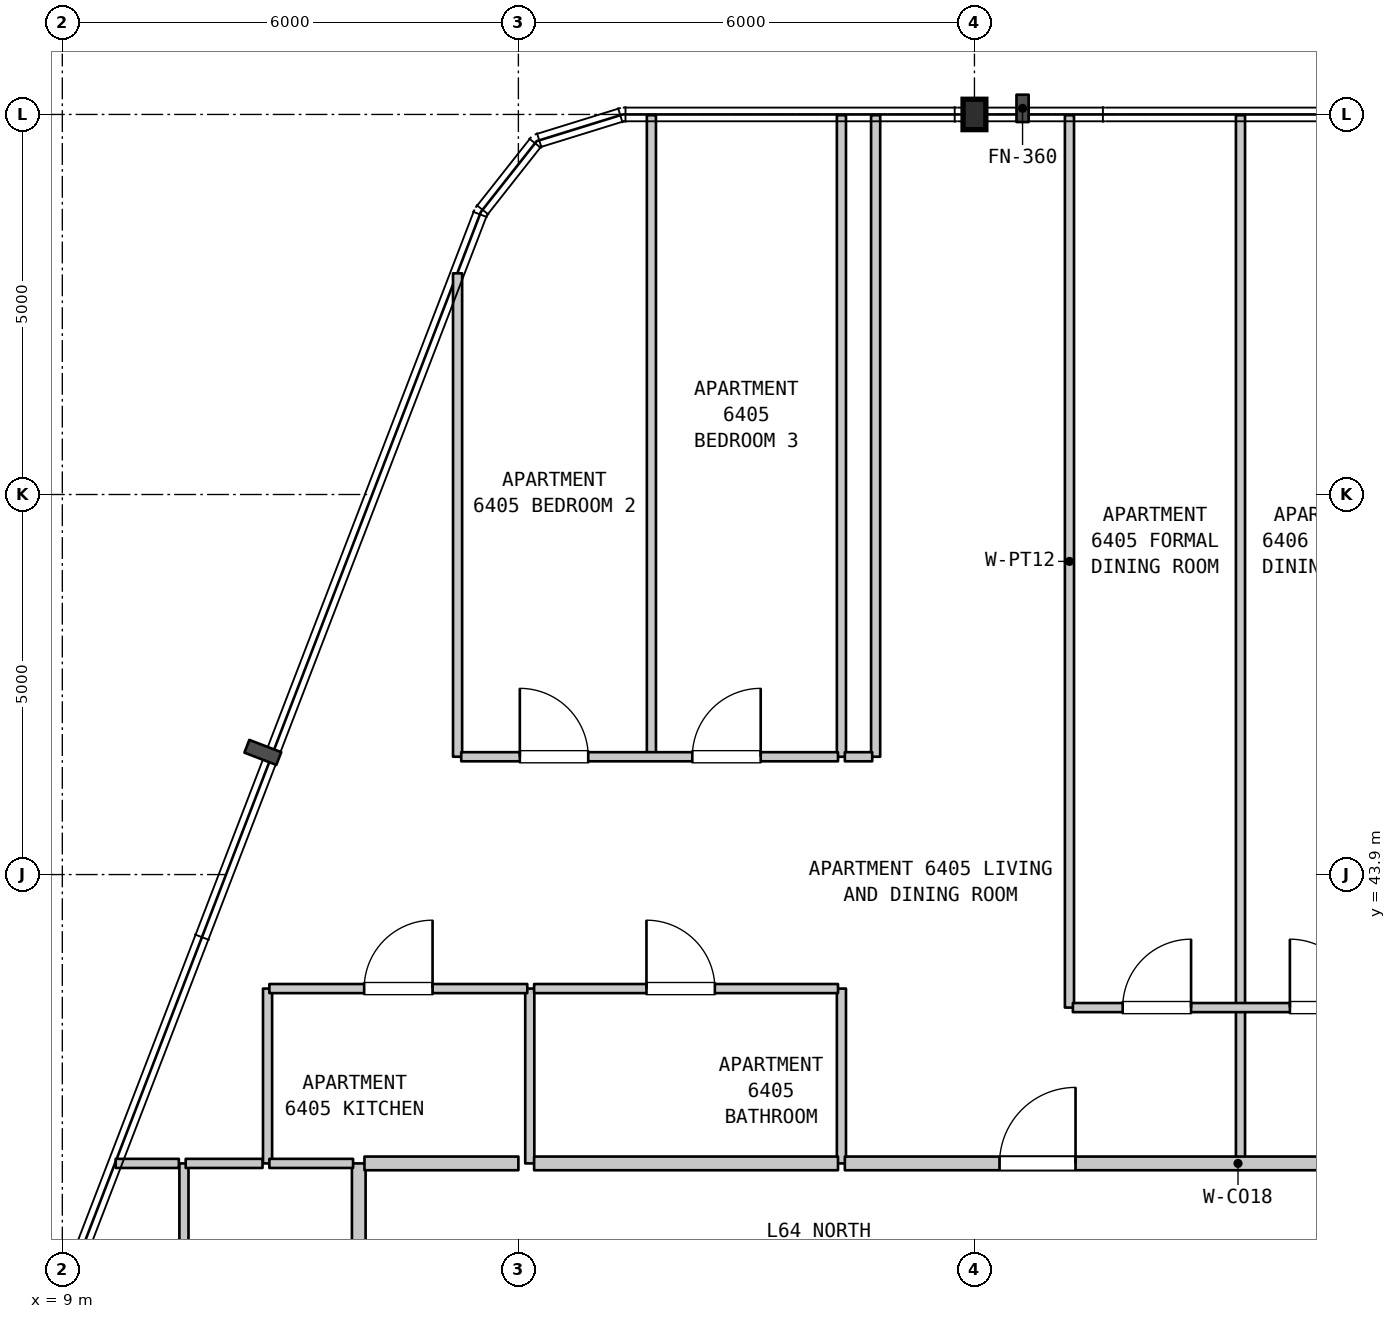
"""IFC4 building model, lengths in metres.
Left out: names, types, materials, properties, quantities, classifications, styles, units other than length and angle.
Written with IfcOpenShell. Run it as: python <this file> out.ifc"""

import sys

from ifc_helpers import new_model, si_unit, direction, frame, frame_2d, origin, origin_2d, place, context, subcontext, project, spatial, rectangle, i_section, extrude, element, fill, save


model = new_model("IFC4")
c1 = context("Model", 3, precision=1e-05, world=origin(), true_north=direction((0.0, 1.0)))
c2 = subcontext(c1, "Body", "Model", "MODEL_VIEW")
j1 = project(units=[si_unit("LENGTHUNIT", "METRE"), si_unit("PLANEANGLEUNIT", "RADIAN")], contexts=[c1])
p1 = place(None, origin())
s1 = spatial("IfcSite", under=j1, at=p1, CompositionType="ELEMENT")
p2 = place(p1, origin())
s2 = spatial("IfcBuilding", under=s1, at=p2, CompositionType="ELEMENT")
p3 = place(p2, frame((0.0, 0.0, 258.4)))
s3 = spatial("IfcBuildingStorey", under=s2, at=p3, CompositionType="ELEMENT", Elevation=258.4)
p4 = place(p3, frame((21.0, 53.9, 0.0), z_axis=(0.0, 0.0, 1.0), x_axis=(1.0, 0.0, 0.0)))
e1 = element("IfcColumn", 1, at=p4, inside=s3, PredefinedType="COLUMN", context=c2, shape_type="SweptSolid", body=[
    extrude(i_section(OverallWidth=0.3, OverallDepth=0.4, WebThickness=0.013, FlangeThickness=0.024, FilletRadius=0.027, at=origin_2d()), origin(), (0.0, 0.0, 1.0), 3.7),
])
p5 = place(p3, frame((10.6, 31.5, 0.0), z_axis=(0.0, 0.0, 1.0), x_axis=(0.0, 1.0, 0.0)))
e2 = element("IfcWall", 2, at=p5, inside=s3, PredefinedType="PARTITIONING", context=c2, shape_type="SweptSolid", body=[
    extrude(rectangle(XDim=8.6, YDim=0.12, at=frame_2d((4.3, 0.0))), origin(), (0.0, 0.0, 1.0), 3.39),
])
p6 = place(p3, frame((11.7, 40.1, 0.0), z_axis=(0.0, 0.0, 1.0), x_axis=(0.0, 1.0, 0.0)))
e3 = element("IfcWall", 3, at=p6, inside=s3, PredefinedType="PARTITIONING", context=c2, shape_type="SweptSolid", body=[
    extrude(rectangle(XDim=2.3, YDim=0.12, at=frame_2d((1.15, 0.0))), origin(), (0.0, 0.0, 1.0), 3.39),
])
p7 = place(p3, frame((12.9, 31.5, 0.0), z_axis=(0.0, 0.0, 1.0), x_axis=(0.0, 1.0, 0.0)))
e4 = element("IfcWall", 4, at=p7, inside=s3, PredefinedType="STANDARD", context=c2, shape_type="SweptSolid", body=[
    extrude(rectangle(XDim=8.6, YDim=0.18, at=frame_2d((4.3, 0.0))), origin(), (0.0, 0.0, 1.0), 3.39),
])
p8 = place(p3, frame((14.2, 45.45, 0.0), z_axis=(0.0, 0.0, 1.0), x_axis=(0.0, 1.0, 0.0)))
e5 = element("IfcWall", 5, at=p8, inside=s3, PredefinedType="PARTITIONING", context=c2, shape_type="SweptSolid", body=[
    extrude(rectangle(XDim=6.36, YDim=0.12, at=frame_2d((3.18, 0.0))), origin(), (0.0, 0.0, 1.0), 3.39),
])
p9 = place(p3, frame((15.15, 40.1, 0.0), z_axis=(0.0, 0.0, 1.0), x_axis=(0.0, 1.0, 0.0)))
e6 = element("IfcWall", 6, at=p9, inside=s3, PredefinedType="PARTITIONING", context=c2, shape_type="SweptSolid", body=[
    extrude(rectangle(XDim=2.3, YDim=0.12, at=frame_2d((1.15, 0.0))), origin(), (0.0, 0.0, 1.0), 3.39),
])
p10 = place(p3, frame((16.75, 45.45, 0.0), z_axis=(0.0, 0.0, 1.0), x_axis=(0.0, 1.0, 0.0)))
e7 = element("IfcWall", 7, at=p10, inside=s3, PredefinedType="PARTITIONING", context=c2, shape_type="SweptSolid", body=[
    extrude(rectangle(XDim=8.44, YDim=0.12, at=frame_2d((4.22, 0.0))), origin(), (0.0, 0.0, 1.0), 3.39),
])
p11 = place(p3, frame((19.25, 40.1, 0.0), z_axis=(0.0, 0.0, 1.0), x_axis=(0.0, 1.0, 0.0)))
e8 = element("IfcWall", 8, at=p11, inside=s3, PredefinedType="PARTITIONING", context=c2, shape_type="SweptSolid", body=[
    extrude(rectangle(XDim=2.3, YDim=0.12, at=frame_2d((1.15, 0.0))), origin(), (0.0, 0.0, 1.0), 3.39),
])
for number, where, z_axis, x_axis in (
    (9, (19.25, 45.45, 0.0), (0.0, 0.0, 1.0), (0.0, 1.0, 0.0)),
    (10, (19.7, 45.45, 0.0), (0.0, 0.0, 1.0), (0.0, 1.0, 0.0)),
):
    element("IfcWall", number, at=place(p3, frame(where, z_axis=z_axis, x_axis=x_axis)), inside=s3, PredefinedType="PARTITIONING", context=c2, shape_type="SweptSolid", body=[
        extrude(rectangle(XDim=8.44, YDim=0.12, at=frame_2d((4.22, 0.0))), origin(), (0.0, 0.0, 1.0), 3.39),
    ])
p12 = place(p3, frame((22.25, 42.15, 0.0), z_axis=(0.0, 0.0, 1.0), x_axis=(0.0, 1.0, 0.0)))
e11 = element("IfcWall", 11, at=p12, inside=s3, PredefinedType="PARTITIONING", context=c2, shape_type="SweptSolid", body=[
    extrude(rectangle(XDim=11.74, YDim=0.12, at=frame_2d((5.87, 0.0))), origin(), (0.0, 0.0, 1.0), 3.39),
])
p13 = place(p3, frame((24.5, 40.1, 0.0), z_axis=(0.0, 0.0, 1.0), x_axis=(0.0, 1.0, 0.0)))
e12 = element("IfcWall", 12, at=p13, inside=s3, PredefinedType="PARTITIONING", context=c2, shape_type="SweptSolid", body=[
    extrude(rectangle(XDim=2.05, YDim=0.12, at=frame_2d((1.025, 0.0))), origin(), (0.0, 0.0, 1.0), 3.39),
])
p14 = place(p3, frame((24.5, 42.15, 0.0), z_axis=(0.0, 0.0, 1.0), x_axis=(0.0, 1.0, 0.0)))
e13 = element("IfcWall", 13, at=p14, inside=s3, PredefinedType="PARTITIONING", context=c2, shape_type="SweptSolid", body=[
    extrude(rectangle(XDim=11.74, YDim=0.12, at=frame_2d((5.87, 0.0))), origin(), (0.0, 0.0, 1.0), 3.39),
])
p15 = place(p3, frame((9.702, 40.1, 0.0), z_axis=(0.0, 0.0, 1.0), x_axis=(1.0, 0.0, 0.0)))
e14 = element("IfcWall", 14, at=p15, inside=s3, PredefinedType="PARTITIONING", context=c2, shape_type="SweptSolid", body=[
    extrude(rectangle(XDim=0.831, YDim=0.12, at=frame_2d((0.416, 0.0))), origin(), (0.0, 0.0, 1.0), 3.39),
])
p16 = place(p3, frame((10.623, 40.1, 0.0), z_axis=(0.0, 0.0, 1.0), x_axis=(1.0, 0.0, 0.0)))
e15 = element("IfcWall", 15, at=p16, inside=s3, PredefinedType="PARTITIONING", context=c2, shape_type="SweptSolid", body=[
    extrude(rectangle(XDim=1.011, YDim=0.12, at=frame_2d((0.505, 0.0))), origin(), (0.0, 0.0, 1.0), 3.39),
])
p17 = place(p3, frame((11.724, 40.1, 0.0), z_axis=(0.0, 0.0, 1.0), x_axis=(1.0, 0.0, 0.0)))
e16 = element("IfcWall", 16, at=p17, inside=s3, PredefinedType="PARTITIONING", context=c2, shape_type="SweptSolid", body=[
    extrude(rectangle(XDim=1.101, YDim=0.12, at=frame_2d((0.55, 0.0))), origin(), (0.0, 0.0, 1.0), 3.39),
])
p18 = place(p3, frame((12.975, 40.1, 0.0), z_axis=(0.0, 0.0, 1.0), x_axis=(1.0, 0.0, 0.0)))
e17 = element("IfcWall", 17, at=p18, inside=s3, PredefinedType="STANDARD", context=c2, shape_type="SweptSolid", body=[
    extrude(rectangle(XDim=2.025, YDim=0.18, at=frame_2d((1.012, 0.0))), origin(), (0.0, 0.0, 1.0), 3.39),
])
p19 = place(p3, frame((15.207, 40.1, 0.0), z_axis=(0.0, 0.0, 1.0), x_axis=(1.0, 0.0, 0.0)))
e18 = element("IfcWall", 18, at=p19, inside=s3, PredefinedType="STANDARD", context=c2, shape_type="SweptSolid", body=[
    extrude(rectangle(XDim=3.998, YDim=0.18, at=frame_2d((1.999, 0.0))), origin(), (0.0, 0.0, 1.0), 3.39),
])
p20 = place(p3, frame((19.295, 40.1, 0.0), z_axis=(0.0, 0.0, 1.0), x_axis=(1.0, 0.0, 0.0)))
e19 = element("IfcWall", 19, at=p20, inside=s3, PredefinedType="STANDARD", context=c2, shape_type="SweptSolid", body=[
    extrude(rectangle(XDim=10.345, YDim=0.18, at=frame_2d((5.172, 0.0))), origin(), (0.0, 0.0, 1.0), 3.39),
])
p21 = place(p20, frame((2.035, 0.0, 0.0)))
e20 = element("IfcOpeningElement", 20, at=p21, cuts=e19, PredefinedType="OPENING", context=c2, shape_type="SweptSolid", body=[
    extrude(rectangle(XDim=1.0, YDim=2.15, at=frame_2d((0.5, 1.075))), frame((0.0, 0.1, 0.0), z_axis=(0.0, -1.0, 0.0), x_axis=(1.0, 0.0, 0.0)), (0.0, 0.0, 1.0), 0.2),
])
p22 = place(p20, frame((7.235, 0.0, 0.0)))
e21 = element("IfcOpeningElement", 21, at=p22, cuts=e19, PredefinedType="OPENING", context=c2, shape_type="SweptSolid", body=[
    extrude(rectangle(XDim=1.0, YDim=2.15, at=frame_2d((0.5, 1.075))), frame((0.0, 0.1, 0.0), z_axis=(0.0, -1.0, 0.0), x_axis=(1.0, 0.0, 0.0)), (0.0, 0.0, 1.0), 0.2),
])
p23 = place(p3, frame((22.295, 42.15, 0.0), z_axis=(0.0, 0.0, 1.0), x_axis=(1.0, 0.0, 0.0)))
e22 = element("IfcWall", 22, at=p23, inside=s3, PredefinedType="PARTITIONING", context=c2, shape_type="SweptSolid", body=[
    extrude(rectangle(XDim=4.41, YDim=0.12, at=frame_2d((2.205, 0.0))), origin(), (0.0, 0.0, 1.0), 3.39),
])
p24 = place(p23, frame((0.655, 0.0, 0.0)))
e23 = element("IfcOpeningElement", 23, at=p24, cuts=e22, PredefinedType="OPENING", context=c2, shape_type="SweptSolid", body=[
    extrude(rectangle(XDim=0.9, YDim=2.15, at=frame_2d((0.45, 1.075))), frame((0.0, 0.07, 0.0), z_axis=(0.0, -1.0, 0.0), x_axis=(1.0, 0.0, 0.0)), (0.0, 0.0, 1.0), 0.14),
])
p25 = place(p23, frame((2.855, 0.0, 0.0)))
e24 = element("IfcOpeningElement", 24, at=p25, cuts=e22, PredefinedType="OPENING", context=c2, shape_type="SweptSolid", body=[
    extrude(rectangle(XDim=0.9, YDim=2.15, at=frame_2d((0.45, 1.075))), frame((0.0, 0.07, 0.0), z_axis=(0.0, -1.0, 0.0), x_axis=(1.0, 0.0, 0.0)), (0.0, 0.0, 1.0), 0.14),
])
p26 = place(p3, frame((11.724, 42.4, 0.0), z_axis=(0.0, 0.0, 1.0), x_axis=(1.0, 0.0, 0.0)))
e25 = element("IfcWall", 25, at=p26, inside=s3, PredefinedType="PARTITIONING", context=c2, shape_type="SweptSolid", body=[
    extrude(rectangle(XDim=3.393, YDim=0.12, at=frame_2d((1.696, 0.0))), origin(), (0.0, 0.0, 1.0), 3.39),
])
p27 = place(p26, frame((1.247, 0.0, 0.0)))
e26 = element("IfcOpeningElement", 26, at=p27, cuts=e25, PredefinedType="OPENING", context=c2, shape_type="SweptSolid", body=[
    extrude(rectangle(XDim=0.9, YDim=2.15, at=frame_2d((0.45, 1.075))), frame((0.0, 0.07, 0.0), z_axis=(0.0, -1.0, 0.0), x_axis=(1.0, 0.0, 0.0)), (0.0, 0.0, 1.0), 0.14),
])
p28 = place(p3, frame((15.207, 42.4, 0.0), z_axis=(0.0, 0.0, 1.0), x_axis=(1.0, 0.0, 0.0)))
e27 = element("IfcWall", 27, at=p28, inside=s3, PredefinedType="PARTITIONING", context=c2, shape_type="SweptSolid", body=[
    extrude(rectangle(XDim=3.998, YDim=0.12, at=frame_2d((1.999, 0.0))), origin(), (0.0, 0.0, 1.0), 3.39),
])
p29 = place(p28, frame((1.478, 0.0, 0.0)))
e28 = element("IfcOpeningElement", 28, at=p29, cuts=e27, PredefinedType="OPENING", context=c2, shape_type="SweptSolid", body=[
    extrude(rectangle(XDim=0.9, YDim=2.1, at=frame_2d((0.45, 1.05))), frame((0.0, 0.07, 0.0), z_axis=(0.0, -1.0, 0.0), x_axis=(1.0, 0.0, 0.0)), (0.0, 0.0, 1.0), 0.14),
])
p30 = place(p3, frame((14.248, 45.45, 0.0), z_axis=(0.0, 0.0, 1.0), x_axis=(1.0, 0.0, 0.0)))
e29 = element("IfcWall", 29, at=p30, inside=s3, PredefinedType="PARTITIONING", context=c2, shape_type="SweptSolid", body=[
    extrude(rectangle(XDim=4.957, YDim=0.12, at=frame_2d((2.479, 0.0))), origin(), (0.0, 0.0, 1.0), 3.39),
])
p31 = place(p30, frame((0.771, 0.0, 0.0)))
e30 = element("IfcOpeningElement", 30, at=p31, cuts=e29, PredefinedType="OPENING", context=c2, shape_type="SweptSolid", body=[
    extrude(rectangle(XDim=0.9, YDim=2.15, at=frame_2d((0.45, 1.075))), frame((0.0, 0.07, 0.0), z_axis=(0.0, -1.0, 0.0), x_axis=(1.0, 0.0, 0.0)), (0.0, 0.0, 1.0), 0.14),
])
p32 = place(p30, frame((3.04, 0.0, 0.0)))
e31 = element("IfcOpeningElement", 31, at=p32, cuts=e29, PredefinedType="OPENING", context=c2, shape_type="SweptSolid", body=[
    extrude(rectangle(XDim=0.9, YDim=2.15, at=frame_2d((0.45, 1.075))), frame((0.0, 0.07, 0.0), z_axis=(0.0, -1.0, 0.0), x_axis=(1.0, 0.0, 0.0)), (0.0, 0.0, 1.0), 0.14),
])
p33 = place(p3, frame((19.295, 45.45, 0.0), z_axis=(0.0, 0.0, 1.0), x_axis=(1.0, 0.0, 0.0)))
e32 = element("IfcWall", 32, at=p33, inside=s3, PredefinedType="PARTITIONING", context=c2, shape_type="SweptSolid", body=[
    extrude(rectangle(XDim=0.36, YDim=0.12, at=frame_2d((0.18, 0.0))), origin(), (0.0, 0.0, 1.0), 3.39),
])
p34 = place(p21, origin())
e33 = element("IfcDoor", 33, at=p34, inside=s3, OperationType="SINGLE_SWING_RIGHT", PredefinedType="DOOR", context=c2, shape_type="SweptSolid", body=[
    extrude(rectangle(XDim=1.0, YDim=2.15, at=frame_2d((0.5, 1.075))), frame((0.0, 0.025, 0.0), z_axis=(0.0, -1.0, 0.0), x_axis=(1.0, 0.0, 0.0)), (0.0, 0.0, 1.0), 0.05),
])
fill(e20, e33)
p35 = place(p24, origin())
e34 = element("IfcDoor", 34, at=p35, inside=s3, OperationType="SINGLE_SWING_RIGHT", PredefinedType="DOOR", context=c2, shape_type="SweptSolid", body=[
    extrude(rectangle(XDim=0.9, YDim=2.15, at=frame_2d((0.45, 1.075))), frame((0.0, 0.025, 0.0), z_axis=(0.0, -1.0, 0.0), x_axis=(1.0, 0.0, 0.0)), (0.0, 0.0, 1.0), 0.05),
])
fill(e23, e34)
p36 = place(p25, origin())
e35 = element("IfcDoor", 35, at=p36, inside=s3, OperationType="SINGLE_SWING_LEFT", PredefinedType="DOOR", context=c2, shape_type="SweptSolid", body=[
    extrude(rectangle(XDim=0.9, YDim=2.15, at=frame_2d((0.45, 1.075))), frame((0.0, 0.025, 0.0), z_axis=(0.0, -1.0, 0.0), x_axis=(1.0, 0.0, 0.0)), (0.0, 0.0, 1.0), 0.05),
])
fill(e24, e35)
p37 = place(p27, origin())
e36 = element("IfcDoor", 36, at=p37, inside=s3, OperationType="SINGLE_SWING_RIGHT", PredefinedType="DOOR", context=c2, shape_type="SweptSolid", body=[
    extrude(rectangle(XDim=0.9, YDim=2.15, at=frame_2d((0.45, 1.075))), frame((0.0, 0.025, 0.0), z_axis=(0.0, -1.0, 0.0), x_axis=(1.0, 0.0, 0.0)), (0.0, 0.0, 1.0), 0.05),
])
fill(e26, e36)
p38 = place(p29, origin())
e37 = element("IfcDoor", 37, at=p38, inside=s3, OperationType="SINGLE_SWING_LEFT", PredefinedType="DOOR", context=c2, shape_type="SweptSolid", body=[
    extrude(rectangle(XDim=0.9, YDim=2.1, at=frame_2d((0.45, 1.05))), frame((0.0, 0.025, 0.0), z_axis=(0.0, -1.0, 0.0), x_axis=(1.0, 0.0, 0.0)), (0.0, 0.0, 1.0), 0.05),
])
fill(e28, e37)
p39 = place(p31, origin())
e38 = element("IfcDoor", 38, at=p39, inside=s3, OperationType="SINGLE_SWING_LEFT", PredefinedType="DOOR", context=c2, shape_type="SweptSolid", body=[
    extrude(rectangle(XDim=0.9, YDim=2.15, at=frame_2d((0.45, 1.075))), frame((0.0, 0.025, 0.0), z_axis=(0.0, -1.0, 0.0), x_axis=(1.0, 0.0, 0.0)), (0.0, 0.0, 1.0), 0.05),
])
fill(e30, e38)
p40 = place(p32, origin())
e39 = element("IfcDoor", 39, at=p40, inside=s3, OperationType="SINGLE_SWING_RIGHT", PredefinedType="DOOR", context=c2, shape_type="SweptSolid", body=[
    extrude(rectangle(XDim=0.9, YDim=2.15, at=frame_2d((0.45, 1.075))), frame((0.0, 0.025, 0.0), z_axis=(0.0, -1.0, 0.0), x_axis=(1.0, 0.0, 0.0)), (0.0, 0.0, 1.0), 0.05),
])
fill(e31, e39)
save(model, sys.argv[1])
